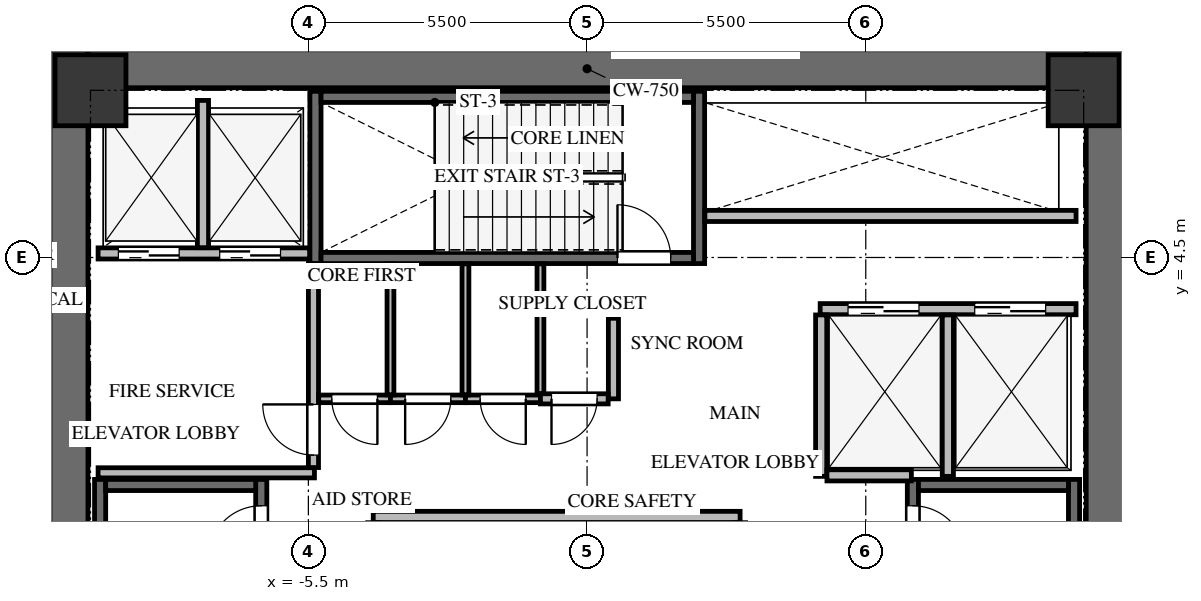
"""IFC4 building model, lengths in metres.
Left out: names, types, materials, properties, quantities, classifications, styles, units other than length and angle.
Written with IfcOpenShell. Run it as: python <this file> out.ifc"""

import sys

from ifc_helpers import new_model, si_unit, direction, frame, frame_2d, origin, origin_2d, place, context, subcontext, project, spatial, rectangle, extrude, source, transform, mapped, element, fill, save


model = new_model("IFC4")
c1 = context("Model", 3, precision=1e-05, world=origin(), true_north=direction((0.0, 1.0)))
c2 = subcontext(c1, "Body", "Model", "MODEL_VIEW")
j1 = project(units=[si_unit("LENGTHUNIT", "METRE"), si_unit("PLANEANGLEUNIT", "RADIAN")], contexts=[c1])
p1 = place(None, origin())
s1 = spatial("IfcSite", under=j1, at=p1, CompositionType="ELEMENT")
p2 = place(p1, origin())
s2 = spatial("IfcBuilding", under=s1, at=p2, CompositionType="ELEMENT")
p3 = place(p2, frame((0.0, 0.0, 150.3)))
s3 = spatial("IfcBuildingStorey", under=s2, at=p3, CompositionType="ELEMENT", Elevation=150.3)
for number, where, z_axis, x_axis in (
    (1, (-10.225, -8.6, 0.0), (0.0, 0.0, 1.0), (0.0, 1.0, 0.0)),
    (2, (10.225, -8.6, 0.0), (0.0, 0.0, 1.0), (0.0, 1.0, 0.0)),
):
    element("IfcWall", number, at=place(p3, frame(where, z_axis=z_axis, x_axis=x_axis)), inside=s3, PredefinedType="SHEAR", context=c2, shape_type="SweptSolid", body=[
        extrude(rectangle(XDim=17.2, YDim=0.75, at=frame_2d((8.6, 0.0))), origin(), (0.0, 0.0, 1.0), 4.8),
    ])
p4 = place(p3, frame((-9.85, 8.225, 0.0), z_axis=(0.0, 0.0, 1.0), x_axis=(1.0, 0.0, 0.0)))
e3 = element("IfcWall", 3, at=p4, inside=s3, PredefinedType="SHEAR", context=c2, shape_type="SweptSolid", body=[
    extrude(rectangle(XDim=19.7, YDim=0.75, at=frame_2d((9.85, 0.0))), origin(), (0.0, 0.0, 1.0), 4.8),
])
p5 = place(p3, frame((-6.43, -7.77, -0.32), z_axis=(0.0, 0.0, 1.0), x_axis=(0.0, 1.0, 0.0)))
e4 = element("IfcWall", 4, at=p5, inside=s3, PredefinedType="SHEAR", context=c2, shape_type="SweptSolid", body=[
    extrude(rectangle(XDim=7.89, YDim=0.22, at=frame_2d((3.945, 0.0))), origin(), (0.0, 0.0, 1.0), 4.8),
])
p6 = place(p5, frame((6.32, 0.0, 0.0)))
e5 = element("IfcOpeningElement", 5, at=p6, cuts=e4, PredefinedType="OPENING", context=c2, shape_type="SweptSolid", body=[
    extrude(rectangle(XDim=1.05, YDim=2.15, at=frame_2d((0.525, 1.075))), frame((0.0, 0.12, 0.0), z_axis=(0.0, -1.0, 0.0), x_axis=(1.0, 0.0, 0.0)), (0.0, 0.0, 1.0), 0.24),
])
p7 = place(p3, frame((-9.61, 0.12, -0.32), z_axis=(0.0, 0.0, 1.0), x_axis=(0.0, -1.0, 0.0)))
e6 = element("IfcWall", 6, at=p7, inside=s3, PredefinedType="SHEAR", context=c2, shape_type="SweptSolid", body=[
    extrude(rectangle(XDim=7.89, YDim=0.22, at=frame_2d((3.945, 0.0))), origin(), (0.0, 0.0, 1.0), 4.8),
])
p8 = place(p3, frame((-6.54, 0.01, -0.32), z_axis=(0.0, 0.0, 1.0), x_axis=(-1.0, 0.0, 0.0)))
e7 = element("IfcWall", 7, at=p8, inside=s3, PredefinedType="SHEAR", context=c2, shape_type="SweptSolid", body=[
    extrude(rectangle(XDim=2.96, YDim=0.22, at=frame_2d((1.48, 0.0))), origin(), (0.0, 0.0, 1.0), 4.8),
])
p9 = place(p3, frame((9.61, -7.77, -0.32), z_axis=(0.0, 0.0, 1.0), x_axis=(0.0, 1.0, 0.0)))
e8 = element("IfcWall", 8, at=p9, inside=s3, PredefinedType="SHEAR", context=c2, shape_type="SweptSolid", body=[
    extrude(rectangle(XDim=7.89, YDim=0.22, at=frame_2d((3.945, 0.0))), origin(), (0.0, 0.0, 1.0), 4.8),
])
p10 = place(p3, frame((6.43, 0.12, -0.32), z_axis=(0.0, 0.0, 1.0), x_axis=(0.0, -1.0, 0.0)))
e9 = element("IfcWall", 9, at=p10, inside=s3, PredefinedType="SHEAR", context=c2, shape_type="SweptSolid", body=[
    extrude(rectangle(XDim=7.89, YDim=0.22, at=frame_2d((3.945, 0.0))), origin(), (0.0, 0.0, 1.0), 4.8),
])
p11 = place(p10, frame((0.52, 0.0, 0.0)))
e10 = element("IfcOpeningElement", 10, at=p11, cuts=e9, PredefinedType="OPENING", context=c2, shape_type="SweptSolid", body=[
    extrude(rectangle(XDim=1.05, YDim=2.15, at=frame_2d((0.525, 1.075))), frame((0.0, 0.12, 0.0), z_axis=(0.0, -1.0, 0.0), x_axis=(1.0, 0.0, 0.0)), (0.0, 0.0, 1.0), 0.24),
])
p12 = place(p3, frame((9.5, 0.01, -0.32), z_axis=(0.0, 0.0, 1.0), x_axis=(-1.0, 0.0, 0.0)))
e11 = element("IfcWall", 11, at=p12, inside=s3, PredefinedType="SHEAR", context=c2, shape_type="SweptSolid", body=[
    extrude(rectangle(XDim=2.96, YDim=0.22, at=frame_2d((1.48, 0.0))), origin(), (0.0, 0.0, 1.0), 4.8),
])
for number, where, z_axis, x_axis in (
    (12, (2.21, 4.38, -0.32), (0.0, 0.0, 1.0), (0.0, 1.0, 0.0)),
    (13, (-5.36, 7.78, -0.32), (0.0, 0.0, 1.0), (0.0, -1.0, 0.0)),
):
    element("IfcWall", number, at=place(p3, frame(where, z_axis=z_axis, x_axis=x_axis)), inside=s3, PredefinedType="SHEAR", context=c2, shape_type="SweptSolid", body=[
        extrude(rectangle(XDim=3.4, YDim=0.22, at=frame_2d((1.7, 0.0))), origin(), (0.0, 0.0, 1.0), 4.8),
    ])
p13 = place(p3, frame((-5.25, 4.49, -0.32), z_axis=(0.0, 0.0, 1.0), x_axis=(1.0, 0.0, 0.0)))
e14 = element("IfcWall", 14, at=p13, inside=s3, PredefinedType="SHEAR", context=c2, shape_type="SweptSolid", body=[
    extrude(rectangle(XDim=7.35, YDim=0.22, at=frame_2d((3.675, 0.0))), origin(), (0.0, 0.0, 1.0), 4.8),
])
p14 = place(p13, frame((5.85, 0.0, 0.0)))
e15 = element("IfcOpeningElement", 15, at=p14, cuts=e14, PredefinedType="OPENING", context=c2, shape_type="SweptSolid", body=[
    extrude(rectangle(XDim=1.05, YDim=2.15, at=frame_2d((0.525, 1.075))), frame((0.0, 0.12, 0.0), z_axis=(0.0, -1.0, 0.0), x_axis=(1.0, 0.0, 0.0)), (0.0, 0.0, 1.0), 0.24),
])
p15 = place(p3, frame((2.1, 7.67, -0.32), z_axis=(0.0, 0.0, 1.0), x_axis=(-1.0, 0.0, 0.0)))
e16 = element("IfcWall", 16, at=p15, inside=s3, PredefinedType="SHEAR", context=c2, shape_type="SweptSolid", body=[
    extrude(rectangle(XDim=7.35, YDim=0.22, at=frame_2d((3.675, 0.0))), origin(), (0.0, 0.0, 1.0), 4.8),
])
m1 = source(origin(), c2, "Body", "SweptSolid", [
    extrude(rectangle(XDim=1.4, YDim=1.4, at=origin_2d()), origin(), (0.0, 0.0, 1.0), 4.8),
])
for number, where, z_axis, x_axis in (
    (17, (9.8, 7.8, -0.32), (0.0, 0.0, 1.0), (1.0, 0.0, 0.0)),
    (18, (-9.8, 7.8, -0.32), (0.0, 0.0, 1.0), (1.0, 0.0, 0.0)),
):
    element("IfcColumn", number, at=place(p3, frame(where, z_axis=z_axis, x_axis=x_axis)), inside=s3, PredefinedType="COLUMN", context=c2, shape_type="MappedRepresentation", body=[
        mapped(m1, transform((0.0, 0.0, 0.0), x_axis=(1.0, 0.0, 0.0), y_axis=(0.0, 1.0, 0.0), z_axis=(0.0, 0.0, 1.0), scale=1.0)),
    ])
p16 = place(p3, frame((-21.326, 3.526, 0.0), z_axis=(0.0, 0.0, 1.0), x_axis=(0.583446750611, 0.812151395493, 0.0)))
e19 = element("IfcWall", 19, at=p16, inside=s3, PredefinedType="PARAPET", context=c2, shape_type="SweptSolid", body=[
    extrude(rectangle(XDim=19.587, YDim=0.22, at=frame_2d((9.794, 0.0))), origin(), (0.0, 0.0, 1.0), 1.2),
])
p17 = place(p3, frame((-9.65, 4.58, 0.0), z_axis=(0.0, 0.0, 1.0), x_axis=(1.0, 0.0, 0.0)))
e20 = element("IfcWall", 20, at=p17, inside=s3, PredefinedType="SOLIDWALL", context=c2, shape_type="SweptSolid", body=[
    extrude(rectangle(XDim=4.175, YDim=0.22, at=frame_2d((2.087, 0.0))), origin(), (0.0, 0.0, 1.0), 4.465),
])
p18 = place(p17, frame((0.4, 0.0, 0.0)))
e21 = element("IfcOpeningElement", 21, at=p18, cuts=e20, PredefinedType="OPENING", context=c2, shape_type="SweptSolid", body=[
    extrude(rectangle(XDim=1.2, YDim=2.15, at=frame_2d((0.6, 1.075))), frame((0.0, 0.12, 0.0), z_axis=(0.0, -1.0, 0.0), x_axis=(1.0, 0.0, 0.0)), (0.0, 0.0, 1.0), 0.24),
])
p19 = place(p17, frame((2.4, 0.0, 0.0)))
e22 = element("IfcOpeningElement", 22, at=p19, cuts=e20, PredefinedType="OPENING", context=c2, shape_type="SweptSolid", body=[
    extrude(rectangle(XDim=1.2, YDim=2.15, at=frame_2d((0.6, 1.075))), frame((0.0, 0.12, 0.0), z_axis=(0.0, -1.0, 0.0), x_axis=(1.0, 0.0, 0.0)), (0.0, 0.0, 1.0), 0.24),
])
p20 = place(p3, frame((-7.58, 4.694, 0.0), z_axis=(0.0, 0.0, 1.0), x_axis=(0.0, 1.0, 0.0)))
e23 = element("IfcWall", 23, at=p20, inside=s3, PredefinedType="SOLIDWALL", context=c2, shape_type="SweptSolid", body=[
    extrude(rectangle(XDim=2.906, YDim=0.22, at=frame_2d((1.453, 0.0))), origin(), (0.0, 0.0, 1.0), 4.465),
])
p21 = place(p3, frame((-9.65, 0.25, 0.0), z_axis=(0.0, 0.0, 1.0), x_axis=(1.0, 0.0, 0.0)))
e24 = element("IfcWall", 24, at=p21, inside=s3, PredefinedType="SOLIDWALL", context=c2, shape_type="SweptSolid", body=[
    extrude(rectangle(XDim=4.27, YDim=0.2, at=frame_2d((2.135, 0.0))), origin(), (0.0, 0.0, 1.0), 4.465),
])
p22 = place(p3, frame((-5.4, 0.354, 0.0), z_axis=(0.0, 0.0, 1.0), x_axis=(0.0, 1.0, 0.0)))
e25 = element("IfcWall", 25, at=p22, inside=s3, PredefinedType="SOLIDWALL", context=c2, shape_type="SweptSolid", body=[
    extrude(rectangle(XDim=4.026, YDim=0.2, at=frame_2d((2.013, 0.0))), origin(), (0.0, 0.0, 1.0), 4.465),
])
p23 = place(p22, frame((0.246, 0.0, 0.0)))
e26 = element("IfcOpeningElement", 26, at=p23, cuts=e25, PredefinedType="OPENING", context=c2, shape_type="SweptSolid", body=[
    extrude(rectangle(XDim=1.0, YDim=2.15, at=frame_2d((0.5, 1.075))), frame((0.0, 0.11, 0.0), z_axis=(0.0, -1.0, 0.0), x_axis=(1.0, 0.0, 0.0)), (0.0, 0.0, 1.0), 0.22),
])
p24 = place(p3, frame((4.6, 3.48, 0.0), z_axis=(0.0, 0.0, 1.0), x_axis=(1.0, 0.0, 0.0)))
e27 = element("IfcWall", 27, at=p24, inside=s3, PredefinedType="SOLIDWALL", context=c2, shape_type="SweptSolid", body=[
    extrude(rectangle(XDim=5.05, YDim=0.22, at=frame_2d((2.525, 0.0))), origin(), (0.0, 0.0, 1.0), 4.465),
])
p25 = place(p24, frame((0.55, 0.0, 0.0)))
e28 = element("IfcOpeningElement", 28, at=p25, cuts=e27, PredefinedType="OPENING", context=c2, shape_type="SweptSolid", body=[
    extrude(rectangle(XDim=1.4, YDim=2.15, at=frame_2d((0.7, 1.075))), frame((0.0, 0.12, 0.0), z_axis=(0.0, -1.0, 0.0), x_axis=(1.0, 0.0, 0.0)), (0.0, 0.0, 1.0), 0.24),
])
p26 = place(p24, frame((3.05, 0.0, 0.0)))
e29 = element("IfcOpeningElement", 29, at=p26, cuts=e27, PredefinedType="OPENING", context=c2, shape_type="SweptSolid", body=[
    extrude(rectangle(XDim=1.4, YDim=2.15, at=frame_2d((0.7, 1.075))), frame((0.0, 0.12, 0.0), z_axis=(0.0, -1.0, 0.0), x_axis=(1.0, 0.0, 0.0)), (0.0, 0.0, 1.0), 0.24),
])
for number, where, z_axis, x_axis in (
    (30, (4.62, 0.18, 0.0), (0.0, 0.0, 1.0), (0.0, 1.0, 0.0)),
    (31, (7.12, 0.18, 0.0), (0.0, 0.0, 1.0), (0.0, 1.0, 0.0)),
):
    element("IfcWall", number, at=place(p3, frame(where, z_axis=z_axis, x_axis=x_axis)), inside=s3, PredefinedType="SOLIDWALL", context=c2, shape_type="SweptSolid", body=[
        extrude(rectangle(XDim=3.186, YDim=0.22, at=frame_2d((1.593, 0.0))), origin(), (0.0, 0.0, 1.0), 4.465),
    ])
p27 = place(p3, frame((4.734, 0.2, 0.0), z_axis=(0.0, 0.0, 1.0), x_axis=(1.0, 0.0, 0.0)))
e32 = element("IfcWall", 32, at=p27, inside=s3, PredefinedType="SOLIDWALL", context=c2, shape_type="SweptSolid", body=[
    extrude(rectangle(XDim=1.666, YDim=0.22, at=frame_2d((0.833, 0.0))), origin(), (0.0, 0.0, 1.0), 4.465),
])
p28 = place(p3, frame((-4.22, -0.62, 0.0), z_axis=(0.0, 0.0, 1.0), x_axis=(1.0, 0.0, 0.0)))
e33 = element("IfcWall", 33, at=p28, inside=s3, PredefinedType="SOLIDWALL", context=c2, shape_type="SweptSolid", body=[
    extrude(rectangle(XDim=7.24, YDim=0.22, at=frame_2d((3.62, 0.0))), origin(), (0.0, 0.0, 1.0), 4.465),
])
p29 = place(p3, frame((2.325, 5.32, 0.0), z_axis=(0.0, 0.0, 1.0), x_axis=(1.0, 0.0, 0.0)))
e34 = element("IfcWall", 34, at=p29, inside=s3, PredefinedType="SOLIDWALL", context=c2, shape_type="SweptSolid", body=[
    extrude(rectangle(XDim=7.325, YDim=0.22, at=frame_2d((3.663, 0.0))), origin(), (0.0, 0.0, 1.0), 4.465),
])
p30 = place(p3, frame((-3.88, 1.71, 0.0), z_axis=(0.0, 0.0, 1.0), x_axis=(-1.0, 0.0, 0.0)))
e35 = element("IfcWall", 35, at=p30, inside=s3, PredefinedType="PARTITIONING", context=c2, shape_type="SweptSolid", body=[
    extrude(rectangle(XDim=1.416, YDim=0.15, at=frame_2d((0.708, 0.0))), origin(), (0.0, 0.0, 1.0), 4.465),
])
p31 = place(p30, frame((0.258, 0.0, 0.0)))
e36 = element("IfcOpeningElement", 36, at=p31, cuts=e35, PredefinedType="OPENING", context=c2, shape_type="SweptSolid", body=[
    extrude(rectangle(XDim=0.9, YDim=2.05, at=frame_2d((0.45, 1.025))), frame((0.0, 0.085, 0.0), z_axis=(0.0, -1.0, 0.0), x_axis=(1.0, 0.0, 0.0)), (0.0, 0.0, 1.0), 0.17),
])
p32 = place(p3, frame((-2.4, 1.71, 0.0), z_axis=(0.0, 0.0, 1.0), x_axis=(-1.0, 0.0, 0.0)))
e37 = element("IfcWall", 37, at=p32, inside=s3, PredefinedType="PARTITIONING", context=c2, shape_type="SweptSolid", body=[
    extrude(rectangle(XDim=1.48, YDim=0.15, at=frame_2d((0.74, 0.0))), origin(), (0.0, 0.0, 1.0), 4.465),
])
p33 = place(p32, frame((0.29, 0.0, 0.0)))
e38 = element("IfcOpeningElement", 38, at=p33, cuts=e37, PredefinedType="OPENING", context=c2, shape_type="SweptSolid", body=[
    extrude(rectangle(XDim=0.9, YDim=2.05, at=frame_2d((0.45, 1.025))), frame((0.0, 0.085, 0.0), z_axis=(0.0, -1.0, 0.0), x_axis=(1.0, 0.0, 0.0)), (0.0, 0.0, 1.0), 0.17),
])
p34 = place(p3, frame((-0.92, 1.71, 0.0), z_axis=(0.0, 0.0, 1.0), x_axis=(-1.0, 0.0, 0.0)))
e39 = element("IfcWall", 39, at=p34, inside=s3, PredefinedType="PARTITIONING", context=c2, shape_type="SweptSolid", body=[
    extrude(rectangle(XDim=1.48, YDim=0.15, at=frame_2d((0.74, 0.0))), origin(), (0.0, 0.0, 1.0), 4.465),
])
p35 = place(p34, frame((0.29, 0.0, 0.0)))
e40 = element("IfcOpeningElement", 40, at=p35, cuts=e39, PredefinedType="OPENING", context=c2, shape_type="SweptSolid", body=[
    extrude(rectangle(XDim=0.9, YDim=2.05, at=frame_2d((0.45, 1.025))), frame((0.0, 0.085, 0.0), z_axis=(0.0, -1.0, 0.0), x_axis=(1.0, 0.0, 0.0)), (0.0, 0.0, 1.0), 0.17),
])
p36 = place(p3, frame((0.52, 3.3, 0.0), z_axis=(0.0, 0.0, 1.0), x_axis=(0.0, -1.0, 0.0)))
e41 = element("IfcWall", 41, at=p36, inside=s3, PredefinedType="SOLIDWALL", context=c2, shape_type="SweptSolid", body=[
    extrude(rectangle(XDim=1.59, YDim=0.2, at=frame_2d((0.795, 0.0))), origin(), (0.0, 0.0, 1.0), 4.465),
])
p37 = place(p3, frame((0.416, 1.71, 0.0), z_axis=(0.0, 0.0, 1.0), x_axis=(-1.0, 0.0, 0.0)))
e42 = element("IfcWall", 42, at=p37, inside=s3, PredefinedType="SOLIDWALL", context=c2, shape_type="SweptSolid", body=[
    extrude(rectangle(XDim=1.336, YDim=0.2, at=frame_2d((0.668, 0.0))), origin(), (0.0, 0.0, 1.0), 4.465),
])
p38 = place(p37, frame((0.218, 0.0, 0.0)))
e43 = element("IfcOpeningElement", 43, at=p38, cuts=e42, PredefinedType="OPENING", context=c2, shape_type="SweptSolid", body=[
    extrude(rectangle(XDim=0.9, YDim=2.05, at=frame_2d((0.45, 1.025))), frame((0.0, 0.11, 0.0), z_axis=(0.0, -1.0, 0.0), x_axis=(1.0, 0.0, 0.0)), (0.0, 0.0, 1.0), 0.22),
])
for number, where, z_axis, x_axis in (
    (44, (-3.88, 4.375, 0.0), (0.0, 0.0, 1.0), (0.0, -1.0, 0.0)),
    (45, (-2.4, 4.375, 0.0), (0.0, 0.0, 1.0), (0.0, -1.0, 0.0)),
):
    element("IfcWall", number, at=place(p3, frame(where, z_axis=z_axis, x_axis=x_axis)), inside=s3, PredefinedType="PARTITIONING", context=c2, shape_type="SweptSolid", body=[
        extrude(rectangle(XDim=2.586, YDim=0.135, at=frame_2d((1.293, 0.0))), origin(), (0.0, 0.0, 1.0), 4.465),
    ])
p39 = place(p3, frame((-0.92, 4.375, 0.0), z_axis=(0.0, 0.0, 1.0), x_axis=(0.0, -1.0, 0.0)))
e46 = element("IfcWall", 46, at=p39, inside=s3, PredefinedType="PARTITIONING", context=c2, shape_type="SweptSolid", body=[
    extrude(rectangle(XDim=2.561, YDim=0.135, at=frame_2d((1.281, 0.0))), origin(), (0.0, 0.0, 1.0), 4.465),
])
m2 = source(origin(), c2, "Body", "SweptSolid", [
    extrude(rectangle(XDim=1.05, YDim=2.15, at=frame_2d((0.525, 1.075))), frame((0.0, 0.025, 0.0), z_axis=(0.0, -1.0, 0.0), x_axis=(1.0, 0.0, 0.0)), (0.0, 0.0, 1.0), 0.05),
])
p40 = place(p6, origin())
e47 = element("IfcDoor", 47, at=p40, inside=s3, OperationType="SINGLE_SWING_LEFT", PredefinedType="DOOR", context=c2, shape_type="MappedRepresentation", body=[
    mapped(m2, transform((0.0, 0.0, 0.0), x_axis=(1.0, 0.0, 0.0), y_axis=(0.0, 1.0, 0.0), z_axis=(0.0, 0.0, 1.0), scale=1.0)),
])
fill(e5, e47)
m3 = source(origin(), c2, "Body", "SweptSolid", [
    extrude(rectangle(XDim=1.05, YDim=2.15, at=frame_2d((0.525, 1.075))), frame((0.0, 0.025, 0.0), z_axis=(0.0, -1.0, 0.0), x_axis=(1.0, 0.0, 0.0)), (0.0, 0.0, 1.0), 0.05),
])
p41 = place(p11, origin())
e48 = element("IfcDoor", 48, at=p41, inside=s3, OperationType="SINGLE_SWING_RIGHT", PredefinedType="DOOR", context=c2, shape_type="MappedRepresentation", body=[
    mapped(m3, transform((0.0, 0.0, 0.0), x_axis=(1.0, 0.0, 0.0), y_axis=(0.0, 1.0, 0.0), z_axis=(0.0, 0.0, 1.0), scale=1.0)),
])
fill(e10, e48)
p42 = place(p14, origin())
e49 = element("IfcDoor", 49, at=p42, inside=s3, OperationType="SINGLE_SWING_LEFT", PredefinedType="DOOR", context=c2, shape_type="MappedRepresentation", body=[
    mapped(m2, transform((0.0, 0.0, 0.0), x_axis=(1.0, 0.0, 0.0), y_axis=(0.0, 1.0, 0.0), z_axis=(0.0, 0.0, 1.0), scale=1.0)),
])
fill(e15, e49)
m4 = source(origin(), c2, "Body", "SweptSolid", [
    extrude(rectangle(XDim=1.2, YDim=2.15, at=frame_2d((0.6, 1.075))), frame((0.0, 0.025, 0.0), z_axis=(0.0, -1.0, 0.0), x_axis=(1.0, 0.0, 0.0)), (0.0, 0.0, 1.0), 0.05),
])
p43 = place(p18, origin())
e50 = element("IfcDoor", 50, at=p43, inside=s3, OperationType="DOUBLE_DOOR_SLIDING", PredefinedType="DOOR", context=c2, shape_type="MappedRepresentation", body=[
    mapped(m4, transform((0.0, 0.0, 0.0), x_axis=(1.0, 0.0, 0.0), y_axis=(0.0, 1.0, 0.0), z_axis=(0.0, 0.0, 1.0), scale=1.0)),
])
fill(e21, e50)
p44 = place(p19, origin())
e51 = element("IfcDoor", 51, at=p44, inside=s3, OperationType="DOUBLE_DOOR_SLIDING", PredefinedType="DOOR", context=c2, shape_type="MappedRepresentation", body=[
    mapped(m4, transform((0.0, 0.0, 0.0), x_axis=(1.0, 0.0, 0.0), y_axis=(0.0, 1.0, 0.0), z_axis=(0.0, 0.0, 1.0), scale=1.0)),
])
fill(e22, e51)
m5 = source(origin(), c2, "Body", "SweptSolid", [
    extrude(rectangle(XDim=1.0, YDim=2.15, at=frame_2d((0.5, 1.075))), frame((0.0, 0.025, 0.0), z_axis=(0.0, -1.0, 0.0), x_axis=(1.0, 0.0, 0.0)), (0.0, 0.0, 1.0), 0.05),
])
p45 = place(p23, origin())
e52 = element("IfcDoor", 52, at=p45, inside=s3, OperationType="SINGLE_SWING_RIGHT", PredefinedType="DOOR", context=c2, shape_type="MappedRepresentation", body=[
    mapped(m5, transform((0.0, 0.0, 0.0), x_axis=(1.0, 0.0, 0.0), y_axis=(0.0, 1.0, 0.0), z_axis=(0.0, 0.0, 1.0), scale=1.0)),
])
fill(e26, e52)
m6 = source(origin(), c2, "Body", "SweptSolid", [
    extrude(rectangle(XDim=1.4, YDim=2.15, at=frame_2d((0.7, 1.075))), frame((0.0, 0.025, 0.0), z_axis=(0.0, -1.0, 0.0), x_axis=(1.0, 0.0, 0.0)), (0.0, 0.0, 1.0), 0.05),
])
p46 = place(p25, origin())
e53 = element("IfcDoor", 53, at=p46, inside=s3, OperationType="DOUBLE_DOOR_SLIDING", PredefinedType="DOOR", context=c2, shape_type="MappedRepresentation", body=[
    mapped(m6, transform((0.0, 0.0, 0.0), x_axis=(1.0, 0.0, 0.0), y_axis=(0.0, 1.0, 0.0), z_axis=(0.0, 0.0, 1.0), scale=1.0)),
])
fill(e28, e53)
p47 = place(p26, origin())
e54 = element("IfcDoor", 54, at=p47, inside=s3, OperationType="DOUBLE_DOOR_SLIDING", PredefinedType="DOOR", context=c2, shape_type="MappedRepresentation", body=[
    mapped(m6, transform((0.0, 0.0, 0.0), x_axis=(1.0, 0.0, 0.0), y_axis=(0.0, 1.0, 0.0), z_axis=(0.0, 0.0, 1.0), scale=1.0)),
])
fill(e29, e54)
m7 = source(origin(), c2, "Body", "SweptSolid", [
    extrude(rectangle(XDim=0.9, YDim=2.05, at=frame_2d((0.45, 1.025))), frame((0.0, 0.025, 0.0), z_axis=(0.0, -1.0, 0.0), x_axis=(1.0, 0.0, 0.0)), (0.0, 0.0, 1.0), 0.05),
])
p48 = place(p31, origin())
e55 = element("IfcDoor", 55, at=p48, inside=s3, OperationType="SINGLE_SWING_LEFT", PredefinedType="DOOR", context=c2, shape_type="MappedRepresentation", body=[
    mapped(m7, transform((0.0, 0.0, 0.0), x_axis=(1.0, 0.0, 0.0), y_axis=(0.0, 1.0, 0.0), z_axis=(0.0, 0.0, 1.0), scale=1.0)),
])
fill(e36, e55)
m8 = source(origin(), c2, "Body", "SweptSolid", [
    extrude(rectangle(XDim=0.9, YDim=2.05, at=frame_2d((0.45, 1.025))), frame((0.0, 0.025, 0.0), z_axis=(0.0, -1.0, 0.0), x_axis=(1.0, 0.0, 0.0)), (0.0, 0.0, 1.0), 0.05),
])
p49 = place(p33, origin())
e56 = element("IfcDoor", 56, at=p49, inside=s3, OperationType="SINGLE_SWING_RIGHT", PredefinedType="DOOR", context=c2, shape_type="MappedRepresentation", body=[
    mapped(m8, transform((0.0, 0.0, 0.0), x_axis=(1.0, 0.0, 0.0), y_axis=(0.0, 1.0, 0.0), z_axis=(0.0, 0.0, 1.0), scale=1.0)),
])
fill(e38, e56)
p50 = place(p35, origin())
e57 = element("IfcDoor", 57, at=p50, inside=s3, OperationType="SINGLE_SWING_LEFT", PredefinedType="DOOR", context=c2, shape_type="MappedRepresentation", body=[
    mapped(m7, transform((0.0, 0.0, 0.0), x_axis=(1.0, 0.0, 0.0), y_axis=(0.0, 1.0, 0.0), z_axis=(0.0, 0.0, 1.0), scale=1.0)),
])
fill(e40, e57)
p51 = place(p38, origin())
e58 = element("IfcDoor", 58, at=p51, inside=s3, OperationType="SINGLE_SWING_RIGHT", PredefinedType="DOOR", context=c2, shape_type="MappedRepresentation", body=[
    mapped(m8, transform((0.0, 0.0, 0.0), x_axis=(1.0, 0.0, 0.0), y_axis=(0.0, 1.0, 0.0), z_axis=(0.0, 0.0, 1.0), scale=1.0)),
])
fill(e43, e58)
save(model, sys.argv[1])
